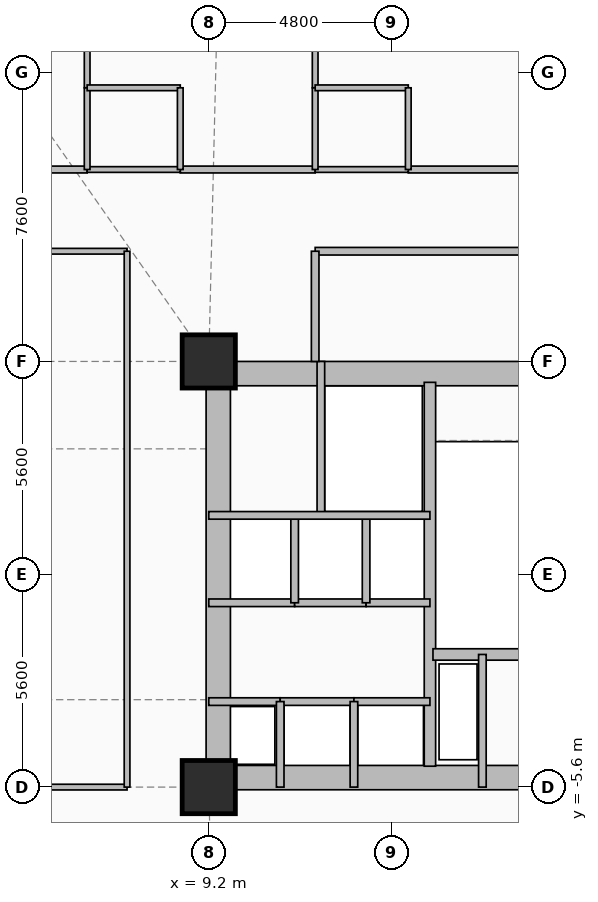
"""IFC4 building model, lengths in metres.
Left out: names, types, materials, properties, quantities, classifications, styles, units other than length and angle.
Written with IfcOpenShell. Run it as: python <this file> out.ifc"""

import sys

from ifc_helpers import new_model, si_unit, direction, frame, frame_2d, origin, origin_2d, place, context, subcontext, project, spatial, rectangle, extrude, element, fill, save


model = new_model("IFC4")
c1 = context("Model", 3, precision=1e-05, world=origin(), true_north=direction((0.0, 1.0)))
c2 = subcontext(c1, "Body", "Model", "MODEL_VIEW")
j1 = project(units=[si_unit("LENGTHUNIT", "METRE"), si_unit("PLANEANGLEUNIT", "RADIAN")], contexts=[c1])
p1 = place(None, origin())
s1 = spatial("IfcSite", under=j1, at=p1, CompositionType="ELEMENT")
p2 = place(p1, origin())
s2 = spatial("IfcBuilding", under=s1, at=p2, CompositionType="ELEMENT")
p3 = place(p2, frame((0.0, 0.0, 22.5)))
s3 = spatial("IfcBuildingStorey", under=s2, at=p3, CompositionType="ELEMENT", Elevation=22.5)
for number, where, z_axis, x_axis in (
    (1, (9.2, -5.6, 0.0), (0.0, 0.0, 1.0), (1.0, 0.0, 0.0)),
    (2, (9.2, 5.6, 0.0), (0.0, 0.0, 1.0), (1.0, 0.0, 0.0)),
):
    element("IfcColumn", number, at=place(p3, frame(where, z_axis=z_axis, x_axis=x_axis)), inside=s3, PredefinedType="COLUMN", context=c2, shape_type="SweptSolid", body=[
        extrude(rectangle(XDim=1.4, YDim=1.4, at=origin_2d()), origin(), (0.0, 0.0, 1.0), 4.5),
    ])
p4 = place(p3, frame((9.2, 5.28, 0.0), z_axis=(0.0, 0.0, 1.0), x_axis=(1.0, 0.0, 0.0)))
e3 = element("IfcWall", 3, at=p4, inside=s3, PredefinedType="SHEAR", context=c2, shape_type="SweptSolid", body=[
    extrude(rectangle(XDim=9.6, YDim=0.64, at=frame_2d((4.8, 0.0))), origin(), (0.0, 0.0, 1.0), 4.16),
])
p5 = place(p4, frame((6.95, 0.0, 0.0)))
e4 = element("IfcOpeningElement", 4, at=p5, cuts=e3, PredefinedType="OPENING", context=c2, shape_type="SweptSolid", body=[
    extrude(rectangle(XDim=1.1, YDim=2.15, at=frame_2d((0.55, 1.075))), frame((0.0, 0.33, 0.0), z_axis=(0.0, -1.0, 0.0), x_axis=(1.0, 0.0, 0.0)), (0.0, 0.0, 1.0), 0.66),
])
p6 = place(p4, frame((3.775, 0.0, 0.0)))
e5 = element("IfcOpeningElement", 5, at=p6, cuts=e3, PredefinedType="OPENING", context=c2, shape_type="SweptSolid", body=[
    extrude(rectangle(XDim=1.05, YDim=2.1, at=frame_2d((0.525, 1.05))), frame((0.0, 0.33, 0.0), z_axis=(0.0, -1.0, 0.0), x_axis=(1.0, 0.0, 0.0)), (0.0, 0.0, 1.0), 0.66),
])
p7 = place(p3, frame((9.2, -5.35, 0.0), z_axis=(0.0, 0.0, 1.0), x_axis=(1.0, 0.0, 0.0)))
e6 = element("IfcWall", 6, at=p7, inside=s3, PredefinedType="SHEAR", context=c2, shape_type="SweptSolid", body=[
    extrude(rectangle(XDim=9.6, YDim=0.64, at=frame_2d((4.8, 0.0))), origin(), (0.0, 0.0, 1.0), 4.16),
])
p8 = place(p7, frame((7.65, 0.0, 0.0)))
e7 = element("IfcOpeningElement", 7, at=p8, cuts=e6, PredefinedType="OPENING", context=c2, shape_type="SweptSolid", body=[
    extrude(rectangle(XDim=0.9, YDim=2.1, at=frame_2d((0.45, 1.05))), frame((0.0, 0.33, 0.0), z_axis=(0.0, -1.0, 0.0), x_axis=(1.0, 0.0, 0.0)), (0.0, 0.0, 1.0), 0.66),
])
p9 = place(p3, frame((9.45, -5.05, 0.0), z_axis=(0.0, 0.0, 1.0), x_axis=(0.0, 1.0, 0.0)))
e8 = element("IfcWall", 8, at=p9, inside=s3, PredefinedType="SHEAR", context=c2, shape_type="SweptSolid", body=[
    extrude(rectangle(XDim=10.1, YDim=0.64, at=frame_2d((5.05, 0.0))), origin(), (0.0, 0.0, 1.0), 4.16),
])
p10 = place(p9, frame((7.15, 0.0, 0.0)))
e9 = element("IfcOpeningElement", 9, at=p10, cuts=e8, PredefinedType="OPENING", context=c2, shape_type="SweptSolid", body=[
    extrude(rectangle(XDim=0.9, YDim=2.1, at=frame_2d((0.45, 1.05))), frame((0.0, 0.33, 0.0), z_axis=(0.0, -1.0, 0.0), x_axis=(1.0, 0.0, 0.0)), (0.0, 0.0, 1.0), 0.66),
])
p11 = place(p9, frame((2.4, 0.0, 0.0)))
e10 = element("IfcOpeningElement", 10, at=p11, cuts=e8, PredefinedType="OPENING", context=c2, shape_type="SweptSolid", body=[
    extrude(rectangle(XDim=1.2, YDim=2.15, at=frame_2d((0.6, 1.075))), frame((0.0, 0.33, 0.0), z_axis=(0.0, -1.0, 0.0), x_axis=(1.0, 0.0, 0.0)), (0.0, 0.0, 1.0), 0.66),
])
p12 = place(p3, frame((15.02, -5.05, 0.0), z_axis=(0.0, 0.0, 1.0), x_axis=(0.0, 1.0, 0.0)))
e11 = element("IfcWall", 11, at=p12, inside=s3, PredefinedType="SHEAR", context=c2, shape_type="SweptSolid", body=[
    extrude(rectangle(XDim=10.1, YDim=0.3, at=frame_2d((5.05, 0.0))), origin(), (0.0, 0.0, 1.0), 4.16),
])
p13 = place(p3, frame((15.1, -2.11, 0.0), z_axis=(0.0, 0.0, 1.0), x_axis=(1.0, 0.0, 0.0)))
e12 = element("IfcWall", 12, at=p13, inside=s3, PredefinedType="SHEAR", context=c2, shape_type="SweptSolid", body=[
    extrude(rectangle(XDim=3.18, YDim=0.3, at=frame_2d((1.59, 0.0))), origin(), (0.0, 0.0, 1.0), 4.16),
])
p14 = place(p3, frame((16.4, -2.11, 0.0), z_axis=(0.0, 0.0, 1.0), x_axis=(0.0, -1.0, 0.0)))
e13 = element("IfcWall", 13, at=p14, inside=s3, PredefinedType="PARTITIONING", context=c2, shape_type="SweptSolid", body=[
    extrude(rectangle(XDim=3.49, YDim=0.2, at=frame_2d((1.745, 0.0))), origin(), (0.0, 0.0, 1.0), 4.16),
])
p15 = place(p3, frame((12.15, 5.6, 0.0), z_axis=(0.0, 0.0, 1.0), x_axis=(0.0, -1.0, 0.0)))
e14 = element("IfcWall", 14, at=p15, inside=s3, PredefinedType="PARTITIONING", context=c2, shape_type="SweptSolid", body=[
    extrude(rectangle(XDim=4.05, YDim=0.2, at=frame_2d((2.025, 0.0))), origin(), (0.0, 0.0, 1.0), 4.16),
])
p16 = place(p3, frame((18.8, 8.5, 0.0), z_axis=(0.0, 0.0, 1.0), x_axis=(-1.0, 0.0, 0.0)))
e15 = element("IfcWall", 15, at=p16, inside=s3, PredefinedType="PARTITIONING", context=c2, shape_type="SweptSolid", body=[
    extrude(rectangle(XDim=6.8, YDim=0.2, at=frame_2d((3.4, 0.0))), origin(), (0.0, 0.0, 1.0), 4.16),
])
p17 = place(p16, frame((3.985, 0.0, 0.0)))
e16 = element("IfcOpeningElement", 16, at=p17, cuts=e15, PredefinedType="OPENING", context=c2, shape_type="SweptSolid", body=[
    extrude(rectangle(XDim=1.1, YDim=2.15, at=frame_2d((0.55, 1.075))), frame((0.0, 0.11, 0.0), z_axis=(0.0, -1.0, 0.0), x_axis=(1.0, 0.0, 0.0)), (0.0, 0.0, 1.0), 0.22),
])
p18 = place(p3, frame((12.0, 8.5, 0.0), z_axis=(0.0, 0.0, 1.0), x_axis=(0.0, -1.0, 0.0)))
e17 = element("IfcWall", 17, at=p18, inside=s3, PredefinedType="PARTITIONING", context=c2, shape_type="SweptSolid", body=[
    extrude(rectangle(XDim=2.9, YDim=0.2, at=frame_2d((1.45, 0.0))), origin(), (0.0, 0.0, 1.0), 4.16),
])
p19 = place(p3, frame((9.2, -3.35, 0.0), z_axis=(0.0, 0.0, 1.0), x_axis=(1.0, 0.0, 0.0)))
e18 = element("IfcWall", 18, at=p19, inside=s3, PredefinedType="PARTITIONING", context=c2, shape_type="SweptSolid", body=[
    extrude(rectangle(XDim=1.88, YDim=0.2, at=frame_2d((0.94, 0.0))), origin(), (0.0, 0.0, 1.0), 3.875),
])
p20 = place(p3, frame((11.08, -3.35, 0.0), z_axis=(0.0, 0.0, 1.0), x_axis=(1.0, 0.0, 0.0)))
e19 = element("IfcWall", 19, at=p20, inside=s3, PredefinedType="PARTITIONING", context=c2, shape_type="SweptSolid", body=[
    extrude(rectangle(XDim=1.94, YDim=0.2, at=frame_2d((0.97, 0.0))), origin(), (0.0, 0.0, 1.0), 4.16),
])
p21 = place(p3, frame((13.02, -3.35, 0.0), z_axis=(0.0, 0.0, 1.0), x_axis=(1.0, 0.0, 0.0)))
e20 = element("IfcWall", 20, at=p21, inside=s3, PredefinedType="PARTITIONING", context=c2, shape_type="SweptSolid", body=[
    extrude(rectangle(XDim=2.0, YDim=0.2, at=frame_2d((1.0, 0.0))), origin(), (0.0, 0.0, 1.0), 4.16),
])
p22 = place(p3, frame((11.46, -0.75, 0.0), z_axis=(0.0, 0.0, 1.0), x_axis=(-1.0, 0.0, 0.0)))
e21 = element("IfcWall", 21, at=p22, inside=s3, PredefinedType="PARTITIONING", context=c2, shape_type="SweptSolid", body=[
    extrude(rectangle(XDim=2.26, YDim=0.2, at=frame_2d((1.13, 0.0))), origin(), (0.0, 0.0, 1.0), 4.16),
])
p23 = place(p22, frame((0.605, 0.0, 0.0)))
e22 = element("IfcOpeningElement", 22, at=p23, cuts=e21, PredefinedType="OPENING", context=c2, shape_type="SweptSolid", body=[
    extrude(rectangle(XDim=1.05, YDim=2.1, at=frame_2d((0.525, 1.05))), frame((0.0, 0.11, 0.0), z_axis=(0.0, -1.0, 0.0), x_axis=(1.0, 0.0, 0.0)), (0.0, 0.0, 1.0), 0.22),
])
p24 = place(p3, frame((13.34, -0.75, 0.0), z_axis=(0.0, 0.0, 1.0), x_axis=(-1.0, 0.0, 0.0)))
e23 = element("IfcWall", 23, at=p24, inside=s3, PredefinedType="PARTITIONING", context=c2, shape_type="SweptSolid", body=[
    extrude(rectangle(XDim=1.88, YDim=0.2, at=frame_2d((0.94, 0.0))), origin(), (0.0, 0.0, 1.0), 4.16),
])
p25 = place(p24, frame((0.415, 0.0, 0.0)))
e24 = element("IfcOpeningElement", 24, at=p25, cuts=e23, PredefinedType="OPENING", context=c2, shape_type="SweptSolid", body=[
    extrude(rectangle(XDim=1.05, YDim=2.1, at=frame_2d((0.525, 1.05))), frame((0.0, 0.11, 0.0), z_axis=(0.0, -1.0, 0.0), x_axis=(1.0, 0.0, 0.0)), (0.0, 0.0, 1.0), 0.22),
])
p26 = place(p3, frame((15.02, -0.75, 0.0), z_axis=(0.0, 0.0, 1.0), x_axis=(-1.0, 0.0, 0.0)))
e25 = element("IfcWall", 25, at=p26, inside=s3, PredefinedType="PARTITIONING", context=c2, shape_type="SweptSolid", body=[
    extrude(rectangle(XDim=1.68, YDim=0.2, at=frame_2d((0.84, 0.0))), origin(), (0.0, 0.0, 1.0), 4.16),
])
for number, where, z_axis, x_axis in (
    (26, (11.08, -5.6, 0.0), (0.0, 0.0, 1.0), (0.0, 1.0, 0.0)),
    (27, (13.02, -5.6, 0.0), (0.0, 0.0, 1.0), (0.0, 1.0, 0.0)),
):
    element("IfcWall", number, at=place(p3, frame(where, z_axis=z_axis, x_axis=x_axis)), inside=s3, PredefinedType="PARTITIONING", context=c2, shape_type="SweptSolid", body=[
        extrude(rectangle(XDim=2.25, YDim=0.2, at=frame_2d((1.125, 0.0))), origin(), (0.0, 0.0, 1.0), 4.16),
    ])
for number, where, z_axis, x_axis in (
    (28, (11.46, -0.75, 0.0), (0.0, 0.0, 1.0), (0.0, 1.0, 0.0)),
    (29, (13.34, -0.75, 0.0), (0.0, 0.0, 1.0), (0.0, 1.0, 0.0)),
):
    element("IfcWall", number, at=place(p3, frame(where, z_axis=z_axis, x_axis=x_axis)), inside=s3, PredefinedType="PARTITIONING", context=c2, shape_type="SweptSolid", body=[
        extrude(rectangle(XDim=2.3, YDim=0.2, at=frame_2d((1.15, 0.0))), origin(), (0.0, 0.0, 1.0), 4.16),
    ])
p27 = place(p3, frame((2.45, 10.65, 0.0), z_axis=(0.0, 0.0, 1.0), x_axis=(1.0, 0.0, 0.0)))
e30 = element("IfcWall", 30, at=p27, inside=s3, PredefinedType="PARTITIONING", context=c2, shape_type="SweptSolid", body=[
    extrude(rectangle(XDim=3.55, YDim=0.18, at=frame_2d((1.775, 0.0))), origin(), (0.0, 0.0, 1.0), 4.16),
])
p28 = place(p27, frame((0.754, 0.0, 0.0)))
e31 = element("IfcOpeningElement", 31, at=p28, cuts=e30, PredefinedType="OPENING", context=c2, shape_type="SweptSolid", body=[
    extrude(rectangle(XDim=1.0, YDim=2.15, at=frame_2d((0.5, 1.075))), frame((0.0, 0.1, 0.0), z_axis=(0.0, -1.0, 0.0), x_axis=(1.0, 0.0, 0.0)), (0.0, 0.0, 1.0), 0.2),
])
p29 = place(p3, frame((8.45, 10.65, 0.0), z_axis=(0.0, 0.0, 1.0), x_axis=(1.0, 0.0, 0.0)))
e32 = element("IfcWall", 32, at=p29, inside=s3, PredefinedType="PARTITIONING", context=c2, shape_type="SweptSolid", body=[
    extrude(rectangle(XDim=3.55, YDim=0.18, at=frame_2d((1.775, 0.0))), origin(), (0.0, 0.0, 1.0), 4.16),
])
p30 = place(p29, frame((1.796, 0.0, 0.0)))
e33 = element("IfcOpeningElement", 33, at=p30, cuts=e32, PredefinedType="OPENING", context=c2, shape_type="SweptSolid", body=[
    extrude(rectangle(XDim=1.0, YDim=2.15, at=frame_2d((0.5, 1.075))), frame((0.0, 0.1, 0.0), z_axis=(0.0, -1.0, 0.0), x_axis=(1.0, 0.0, 0.0)), (0.0, 0.0, 1.0), 0.2),
])
p31 = place(p3, frame((6.0, 10.65, 0.0), z_axis=(0.0, 0.0, 1.0), x_axis=(1.0, 0.0, 0.0)))
e34 = element("IfcWall", 34, at=p31, inside=s3, PredefinedType="PLUMBINGWALL", context=c2, shape_type="SweptSolid", body=[
    extrude(rectangle(XDim=2.45, YDim=0.15, at=frame_2d((1.225, 0.0))), origin(), (0.0, 0.0, 1.0), 4.16),
])
p32 = place(p3, frame((14.45, 10.65, 0.0), z_axis=(0.0, 0.0, 1.0), x_axis=(1.0, 0.0, 0.0)))
e35 = element("IfcWall", 35, at=p32, inside=s3, PredefinedType="PARTITIONING", context=c2, shape_type="SweptSolid", body=[
    extrude(rectangle(XDim=3.55, YDim=0.18, at=frame_2d((1.775, 0.0))), origin(), (0.0, 0.0, 1.0), 4.16),
])
p33 = place(p32, frame((0.754, 0.0, 0.0)))
e36 = element("IfcOpeningElement", 36, at=p33, cuts=e35, PredefinedType="OPENING", context=c2, shape_type="SweptSolid", body=[
    extrude(rectangle(XDim=1.0, YDim=2.15, at=frame_2d((0.5, 1.075))), frame((0.0, 0.1, 0.0), z_axis=(0.0, -1.0, 0.0), x_axis=(1.0, 0.0, 0.0)), (0.0, 0.0, 1.0), 0.2),
])
p34 = place(p3, frame((12.0, 10.65, 0.0), z_axis=(0.0, 0.0, 1.0), x_axis=(1.0, 0.0, 0.0)))
e37 = element("IfcWall", 37, at=p34, inside=s3, PredefinedType="PLUMBINGWALL", context=c2, shape_type="SweptSolid", body=[
    extrude(rectangle(XDim=2.45, YDim=0.15, at=frame_2d((1.225, 0.0))), origin(), (0.0, 0.0, 1.0), 4.16),
])
p35 = place(p3, frame((7.05, 8.5, 0.0), z_axis=(0.0, 0.0, 1.0), x_axis=(-1.0, 0.0, 0.0)))
e38 = element("IfcWall", 38, at=p35, inside=s3, PredefinedType="PARTITIONING", context=c2, shape_type="SweptSolid", body=[
    extrude(rectangle(XDim=7.05, YDim=0.15, at=frame_2d((3.525, 0.0))), origin(), (0.0, 0.0, 1.0), 4.16),
])
p36 = place(p3, frame((0.0, -5.6, 0.0), z_axis=(0.0, 0.0, 1.0), x_axis=(1.0, 0.0, 0.0)))
e39 = element("IfcWall", 39, at=p36, inside=s3, PredefinedType="PARTITIONING", context=c2, shape_type="SweptSolid", body=[
    extrude(rectangle(XDim=7.05, YDim=0.15, at=frame_2d((3.525, 0.0))), origin(), (0.0, 0.0, 1.0), 3.137),
])
p37 = place(p3, frame((7.05, -5.6, 0.0), z_axis=(0.0, 0.0, 1.0), x_axis=(0.0, 1.0, 0.0)))
e40 = element("IfcWall", 40, at=p37, inside=s3, PredefinedType="PARTITIONING", context=c2, shape_type="SweptSolid", body=[
    extrude(rectangle(XDim=14.1, YDim=0.15, at=frame_2d((7.05, 0.0))), origin(), (0.0, 0.0, 1.0), 4.16),
])
p38 = place(p3, frame((6.0, 24.8, 0.0), z_axis=(0.0, 0.0, 1.0), x_axis=(0.0, -1.0, 0.0)))
e41 = element("IfcWall", 41, at=p38, inside=s3, PredefinedType="PARTITIONING", context=c2, shape_type="SweptSolid", body=[
    extrude(rectangle(XDim=12.0, YDim=0.15, at=frame_2d((6.0, 0.0))), origin(), (0.0, 0.0, 1.0), 4.16),
])
p39 = place(p3, frame((6.0, 12.8, 0.0), z_axis=(0.0, 0.0, 1.0), x_axis=(0.0, -1.0, 0.0)))
e42 = element("IfcWall", 42, at=p39, inside=s3, PredefinedType="PLUMBINGWALL", context=c2, shape_type="SweptSolid", body=[
    extrude(rectangle(XDim=2.15, YDim=0.15, at=frame_2d((1.075, 0.0))), origin(), (0.0, 0.0, 1.0), 4.16),
])
p40 = place(p3, frame((8.45, 12.8, 0.0), z_axis=(0.0, 0.0, 1.0), x_axis=(-1.0, 0.0, 0.0)))
e43 = element("IfcWall", 43, at=p40, inside=s3, PredefinedType="PLUMBINGWALL", context=c2, shape_type="SweptSolid", body=[
    extrude(rectangle(XDim=2.45, YDim=0.15, at=frame_2d((1.225, 0.0))), origin(), (0.0, 0.0, 1.0), 4.16),
])
p41 = place(p40, frame((0.921, 0.0, 0.0)))
e44 = element("IfcOpeningElement", 44, at=p41, cuts=e43, PredefinedType="OPENING", context=c2, shape_type="SweptSolid", body=[
    extrude(rectangle(XDim=0.9, YDim=2.1, at=frame_2d((0.45, 1.05))), frame((0.0, 0.085, 0.0), z_axis=(0.0, -1.0, 0.0), x_axis=(1.0, 0.0, 0.0)), (0.0, 0.0, 1.0), 0.17),
])
p42 = place(p3, frame((8.45, 10.65, 0.0), z_axis=(0.0, 0.0, 1.0), x_axis=(0.0, 1.0, 0.0)))
e45 = element("IfcWall", 45, at=p42, inside=s3, PredefinedType="PLUMBINGWALL", context=c2, shape_type="SweptSolid", body=[
    extrude(rectangle(XDim=2.15, YDim=0.15, at=frame_2d((1.075, 0.0))), origin(), (0.0, 0.0, 1.0), 4.16),
])
p43 = place(p3, frame((12.0, 24.8, 0.0), z_axis=(0.0, 0.0, 1.0), x_axis=(0.0, -1.0, 0.0)))
e46 = element("IfcWall", 46, at=p43, inside=s3, PredefinedType="PARTITIONING", context=c2, shape_type="SweptSolid", body=[
    extrude(rectangle(XDim=12.0, YDim=0.15, at=frame_2d((6.0, 0.0))), origin(), (0.0, 0.0, 1.0), 4.16),
])
p44 = place(p3, frame((12.0, 12.8, 0.0), z_axis=(0.0, 0.0, 1.0), x_axis=(0.0, -1.0, 0.0)))
e47 = element("IfcWall", 47, at=p44, inside=s3, PredefinedType="PLUMBINGWALL", context=c2, shape_type="SweptSolid", body=[
    extrude(rectangle(XDim=2.15, YDim=0.15, at=frame_2d((1.075, 0.0))), origin(), (0.0, 0.0, 1.0), 4.16),
])
p45 = place(p3, frame((14.45, 12.8, 0.0), z_axis=(0.0, 0.0, 1.0), x_axis=(-1.0, 0.0, 0.0)))
e48 = element("IfcWall", 48, at=p45, inside=s3, PredefinedType="PLUMBINGWALL", context=c2, shape_type="SweptSolid", body=[
    extrude(rectangle(XDim=2.45, YDim=0.15, at=frame_2d((1.225, 0.0))), origin(), (0.0, 0.0, 1.0), 4.16),
])
p46 = place(p45, frame((0.629, 0.0, 0.0)))
e49 = element("IfcOpeningElement", 49, at=p46, cuts=e48, PredefinedType="OPENING", context=c2, shape_type="SweptSolid", body=[
    extrude(rectangle(XDim=0.9, YDim=2.1, at=frame_2d((0.45, 1.05))), frame((0.0, 0.085, 0.0), z_axis=(0.0, -1.0, 0.0), x_axis=(1.0, 0.0, 0.0)), (0.0, 0.0, 1.0), 0.17),
])
p47 = place(p3, frame((14.45, 10.65, 0.0), z_axis=(0.0, 0.0, 1.0), x_axis=(0.0, 1.0, 0.0)))
e50 = element("IfcWall", 50, at=p47, inside=s3, PredefinedType="PLUMBINGWALL", context=c2, shape_type="SweptSolid", body=[
    extrude(rectangle(XDim=2.15, YDim=0.15, at=frame_2d((1.075, 0.0))), origin(), (0.0, 0.0, 1.0), 4.16),
])
p48 = place(p3, frame((9.2, 1.55, 0.0), z_axis=(0.0, 0.0, 1.0), x_axis=(1.0, 0.0, 0.0)))
e51 = element("IfcWall", 51, at=p48, inside=s3, PredefinedType="PARTITIONING", context=c2, shape_type="SweptSolid", body=[
    extrude(rectangle(XDim=5.82, YDim=0.2, at=frame_2d((2.91, 0.0))), origin(), (0.0, 0.0, 1.0), 4.16),
])
p49 = place(p5, origin())
e52 = element("IfcDoor", 52, at=p49, inside=s3, OperationType="SINGLE_SWING_RIGHT", PredefinedType="DOOR", context=c2, shape_type="SweptSolid", body=[
    extrude(rectangle(XDim=1.1, YDim=2.15, at=frame_2d((0.55, 1.075))), frame((0.0, 0.025, 0.0), z_axis=(0.0, -1.0, 0.0), x_axis=(1.0, 0.0, 0.0)), (0.0, 0.0, 1.0), 0.05),
])
fill(e4, e52)
p50 = place(p6, origin())
e53 = element("IfcDoor", 53, at=p50, inside=s3, OperationType="DOUBLE_DOOR_SLIDING", PredefinedType="DOOR", context=c2, shape_type="SweptSolid", body=[
    extrude(rectangle(XDim=1.05, YDim=2.1, at=frame_2d((0.525, 1.05))), frame((0.0, 0.025, 0.0), z_axis=(0.0, -1.0, 0.0), x_axis=(1.0, 0.0, 0.0)), (0.0, 0.0, 1.0), 0.05),
])
fill(e5, e53)
p51 = place(p8, origin())
e54 = element("IfcDoor", 54, at=p51, inside=s3, OperationType="SINGLE_SWING_RIGHT", PredefinedType="DOOR", context=c2, shape_type="SweptSolid", body=[
    extrude(rectangle(XDim=0.9, YDim=2.1, at=frame_2d((0.45, 1.05))), frame((0.0, 0.025, 0.0), z_axis=(0.0, -1.0, 0.0), x_axis=(1.0, 0.0, 0.0)), (0.0, 0.0, 1.0), 0.05),
])
fill(e7, e54)
p52 = place(p17, origin())
e55 = element("IfcDoor", 55, at=p52, inside=s3, OperationType="SINGLE_SWING_RIGHT", PredefinedType="DOOR", context=c2, shape_type="SweptSolid", body=[
    extrude(rectangle(XDim=1.1, YDim=2.15, at=frame_2d((0.55, 1.075))), frame((0.0, 0.025, 0.0), z_axis=(0.0, -1.0, 0.0), x_axis=(1.0, 0.0, 0.0)), (0.0, 0.0, 1.0), 0.05),
])
fill(e16, e55)
p53 = place(p10, origin())
e56 = element("IfcDoor", 56, at=p53, inside=s3, OperationType="SINGLE_SWING_LEFT", PredefinedType="DOOR", context=c2, shape_type="SweptSolid", body=[
    extrude(rectangle(XDim=0.9, YDim=2.1, at=frame_2d((0.45, 1.05))), frame((0.0, 0.025, 0.0), z_axis=(0.0, -1.0, 0.0), x_axis=(1.0, 0.0, 0.0)), (0.0, 0.0, 1.0), 0.05),
])
fill(e9, e56)
p54 = place(p23, origin())
e57 = element("IfcDoor", 57, at=p54, inside=s3, OperationType="DOUBLE_DOOR_SLIDING", PredefinedType="DOOR", context=c2, shape_type="SweptSolid", body=[
    extrude(rectangle(XDim=1.05, YDim=2.1, at=frame_2d((0.525, 1.05))), frame((0.0, 0.025, 0.0), z_axis=(0.0, -1.0, 0.0), x_axis=(1.0, 0.0, 0.0)), (0.0, 0.0, 1.0), 0.05),
])
fill(e22, e57)
p55 = place(p25, origin())
e58 = element("IfcDoor", 58, at=p55, inside=s3, OperationType="DOUBLE_DOOR_SLIDING", PredefinedType="DOOR", context=c2, shape_type="SweptSolid", body=[
    extrude(rectangle(XDim=1.05, YDim=2.1, at=frame_2d((0.525, 1.05))), frame((0.0, 0.025, 0.0), z_axis=(0.0, -1.0, 0.0), x_axis=(1.0, 0.0, 0.0)), (0.0, 0.0, 1.0), 0.05),
])
fill(e24, e58)
p56 = place(p11, origin())
e59 = element("IfcDoor", 59, at=p56, inside=s3, OperationType="SINGLE_SWING_RIGHT", PredefinedType="DOOR", context=c2, shape_type="SweptSolid", body=[
    extrude(rectangle(XDim=1.2, YDim=2.15, at=frame_2d((0.6, 1.075))), frame((0.0, 0.025, 0.0), z_axis=(0.0, -1.0, 0.0), x_axis=(1.0, 0.0, 0.0)), (0.0, 0.0, 1.0), 0.05),
])
fill(e10, e59)
p57 = place(p30, origin())
e60 = element("IfcDoor", 60, at=p57, inside=s3, OperationType="SINGLE_SWING_RIGHT", PredefinedType="DOOR", context=c2, shape_type="SweptSolid", body=[
    extrude(rectangle(XDim=1.0, YDim=2.15, at=frame_2d((0.5, 1.075))), frame((0.0, 0.025, 0.0), z_axis=(0.0, -1.0, 0.0), x_axis=(1.0, 0.0, 0.0)), (0.0, 0.0, 1.0), 0.05),
])
fill(e33, e60)
p58 = place(p33, origin())
e61 = element("IfcDoor", 61, at=p58, inside=s3, OperationType="SINGLE_SWING_LEFT", PredefinedType="DOOR", context=c2, shape_type="SweptSolid", body=[
    extrude(rectangle(XDim=1.0, YDim=2.15, at=frame_2d((0.5, 1.075))), frame((0.0, 0.025, 0.0), z_axis=(0.0, -1.0, 0.0), x_axis=(1.0, 0.0, 0.0)), (0.0, 0.0, 1.0), 0.05),
])
fill(e36, e61)
p59 = place(p41, origin())
e62 = element("IfcDoor", 62, at=p59, inside=s3, OperationType="SINGLE_SWING_LEFT", PredefinedType="DOOR", context=c2, shape_type="SweptSolid", body=[
    extrude(rectangle(XDim=0.9, YDim=2.1, at=frame_2d((0.45, 1.05))), frame((0.0, 0.025, 0.0), z_axis=(0.0, -1.0, 0.0), x_axis=(1.0, 0.0, 0.0)), (0.0, 0.0, 1.0), 0.05),
])
fill(e44, e62)
p60 = place(p46, origin())
e63 = element("IfcDoor", 63, at=p60, inside=s3, OperationType="SINGLE_SWING_RIGHT", PredefinedType="DOOR", context=c2, shape_type="SweptSolid", body=[
    extrude(rectangle(XDim=0.9, YDim=2.1, at=frame_2d((0.45, 1.05))), frame((0.0, 0.025, 0.0), z_axis=(0.0, -1.0, 0.0), x_axis=(1.0, 0.0, 0.0)), (0.0, 0.0, 1.0), 0.05),
])
fill(e49, e63)
save(model, sys.argv[1])
